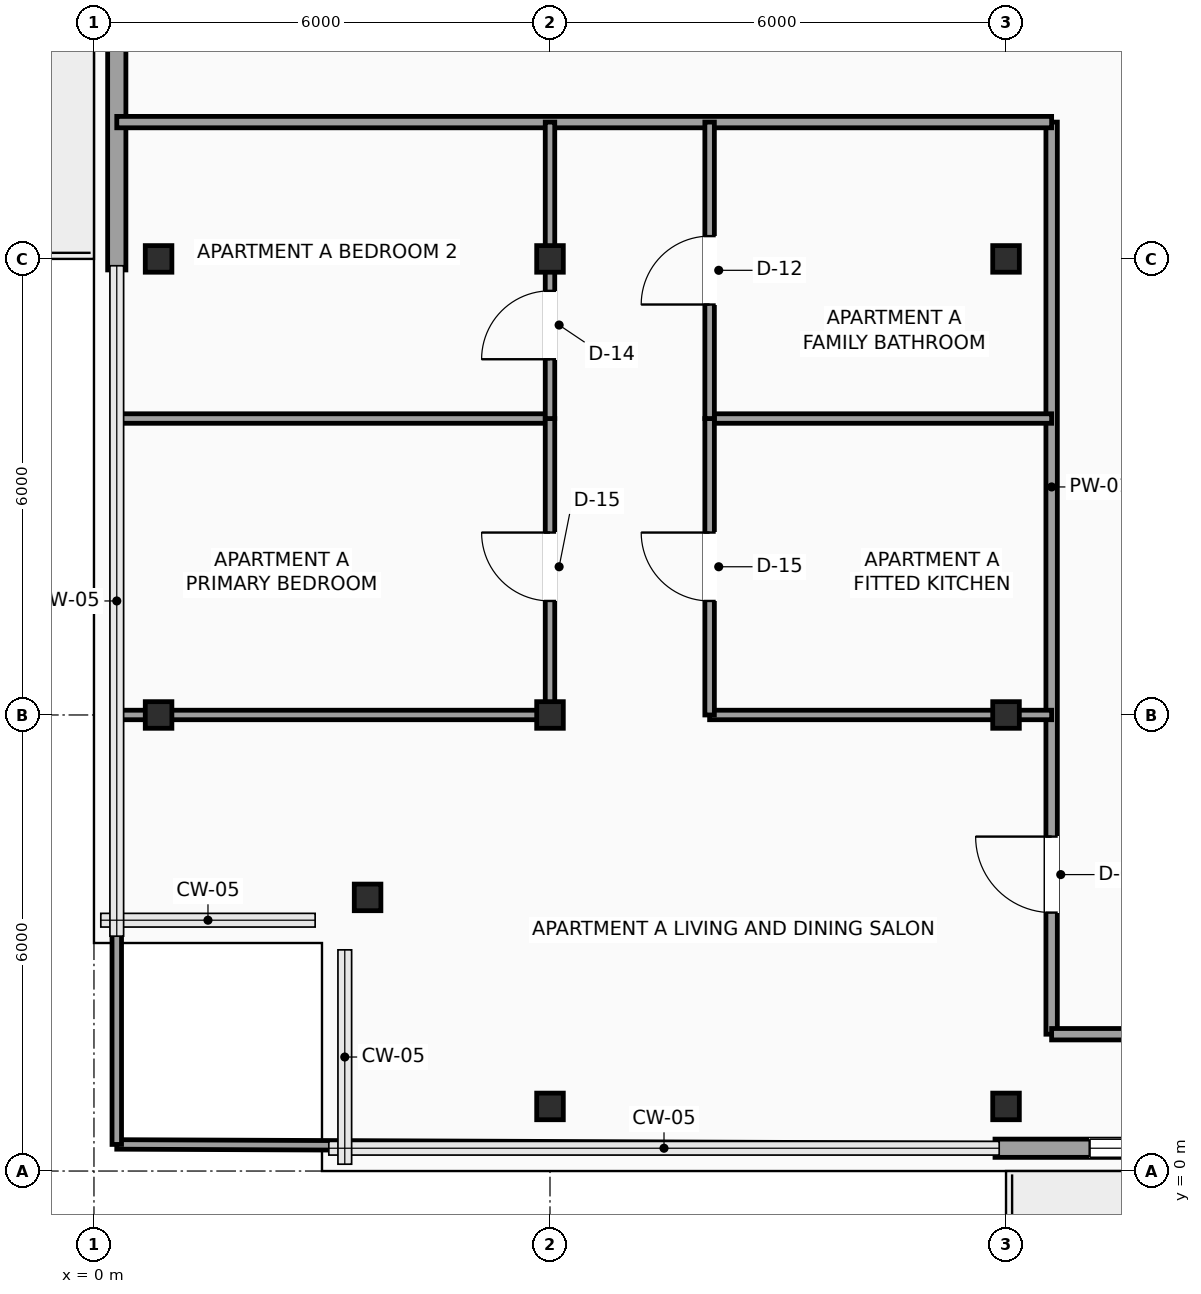
"""IFC4 building model, lengths in metres.
Left out: names, types, materials, properties, quantities, classifications, styles, units other than length and angle.
Written with IfcOpenShell. Run it as: python <this file> out.ifc"""

import sys

from ifc_helpers import new_model, si_unit, direction, frame, frame_2d, origin, origin_2d, place, context, subcontext, project, spatial, rectangle, hollow_rectangle, extrude, element, fill, save


model = new_model("IFC4")
c1 = context("Model", 3, precision=1e-05, world=origin(), true_north=direction((0.0, 1.0)))
c2 = subcontext(c1, "Body", "Model", "MODEL_VIEW")
j1 = project(units=[si_unit("LENGTHUNIT", "METRE"), si_unit("PLANEANGLEUNIT", "RADIAN")], contexts=[c1])
p1 = place(None, origin())
s1 = spatial("IfcSite", under=j1, at=p1, CompositionType="ELEMENT")
p2 = place(p1, origin())
s2 = spatial("IfcBuilding", under=s1, at=p2, CompositionType="ELEMENT")
p3 = place(p2, frame((0.0, 0.0, 267.7)))
s3 = spatial("IfcBuildingStorey", under=s2, at=p3, CompositionType="ELEMENT", Elevation=267.7)
for number, where, z_axis, x_axis in (
    (1, (3.6, 3.6, 0.0), (0.0, 0.0, 1.0), (1.0, 0.0, 0.0)),
    (2, (0.85, 6.0, 0.0), (0.0, 0.0, 1.0), (1.0, 0.0, 0.0)),
    (3, (0.85, 12.0, 0.0), (0.0, 0.0, 1.0), (1.0, 0.0, 0.0)),
    (4, (6.0, 0.85, 0.0), (0.0, 0.0, 1.0), (1.0, 0.0, 0.0)),
    (5, (6.0, 6.0, 0.0), (0.0, 0.0, 1.0), (1.0, 0.0, 0.0)),
    (6, (6.0, 12.0, 0.0), (0.0, 0.0, 1.0), (1.0, 0.0, 0.0)),
    (7, (12.0, 0.85, 0.0), (0.0, 0.0, 1.0), (1.0, 0.0, 0.0)),
    (8, (12.0, 6.0, 0.0), (0.0, 0.0, 1.0), (1.0, 0.0, 0.0)),
    (9, (12.0, 12.0, 0.0), (0.0, 0.0, 1.0), (1.0, 0.0, 0.0)),
):
    element("IfcColumn", number, at=place(p3, frame(where, z_axis=z_axis, x_axis=x_axis)), inside=s3, PredefinedType="COLUMN", context=c2, shape_type="SweptSolid", body=[
        extrude(hollow_rectangle(XDim=0.35, YDim=0.35, WallThickness=0.016, InnerFilletRadius=0.016, OuterFilletRadius=0.032, at=origin_2d()), origin(), (0.0, 0.0, 1.0), 3.5),
    ])
p4 = place(p3, frame((21.145, 0.3, 0.0), z_axis=(0.0, 0.0, 1.0), x_axis=(-1.0, 0.0, 0.0)))
e10 = element("IfcWall", 10, at=p4, inside=s3, PredefinedType="SOLIDWALL", context=c2, shape_type="SweptSolid", body=[
    extrude(rectangle(XDim=9.29, YDim=0.24, at=frame_2d((4.645, 0.0))), origin(), (0.0, 0.0, 1.0), 3.3),
])
p5 = place(p4, frame((3.945, 0.0, 0.0)))
e11 = element("IfcOpeningElement", 11, at=p5, cuts=e10, PredefinedType="OPENING", context=c2, shape_type="SweptSolid", body=[
    extrude(rectangle(XDim=1.05, YDim=2.2, at=frame_2d((0.525, 1.1))), frame((0.0, 0.13, 0.0), z_axis=(0.0, -1.0, 0.0), x_axis=(1.0, 0.0, 0.0)), (0.0, 0.0, 1.0), 0.26),
])
p6 = place(p4, frame((5.345, 0.0, 0.6)))
e12 = element("IfcOpeningElement", 12, at=p6, cuts=e10, PredefinedType="OPENING", context=c2, shape_type="SweptSolid", body=[
    extrude(rectangle(XDim=2.7, YDim=2.3, at=frame_2d((1.35, 1.15))), frame((0.0, 0.13, 0.0), z_axis=(0.0, -1.0, 0.0), x_axis=(1.0, 0.0, 0.0)), (0.0, 0.0, 1.0), 0.26),
])
p7 = place(p4, frame((1.4, 0.0, 0.6)))
e13 = element("IfcOpeningElement", 13, at=p7, cuts=e10, PredefinedType="OPENING", context=c2, shape_type="SweptSolid", body=[
    extrude(rectangle(XDim=0.9, YDim=2.2, at=frame_2d((0.45, 1.1))), frame((0.0, 0.13, 0.0), z_axis=(0.0, -1.0, 0.0), x_axis=(1.0, 0.0, 0.0)), (0.0, 0.0, 1.0), 0.26),
])
p8 = place(p3, frame((0.3, 11.855, 0.0), z_axis=(0.0, 0.0, 1.0), x_axis=(0.0, 1.0, 0.0)))
e14 = element("IfcWall", 14, at=p8, inside=s3, PredefinedType="SOLIDWALL", context=c2, shape_type="SweptSolid", body=[
    extrude(rectangle(XDim=9.29, YDim=0.24, at=frame_2d((4.645, 0.0))), origin(), (0.0, 0.0, 1.0), 3.3),
])
p9 = place(p8, frame((4.7, 0.0, 0.0)))
e15 = element("IfcOpeningElement", 15, at=p9, cuts=e14, PredefinedType="OPENING", context=c2, shape_type="SweptSolid", body=[
    extrude(rectangle(XDim=1.05, YDim=2.2, at=frame_2d((0.525, 1.1))), frame((0.0, 0.13, 0.0), z_axis=(0.0, -1.0, 0.0), x_axis=(1.0, 0.0, 0.0)), (0.0, 0.0, 1.0), 0.26),
])
p10 = place(p8, frame((6.05, 0.0, 0.6)))
e16 = element("IfcOpeningElement", 16, at=p10, cuts=e14, PredefinedType="OPENING", context=c2, shape_type="SweptSolid", body=[
    extrude(rectangle(XDim=2.7, YDim=2.3, at=frame_2d((1.35, 1.15))), frame((0.0, 0.13, 0.0), z_axis=(0.0, -1.0, 0.0), x_axis=(1.0, 0.0, 0.0)), (0.0, 0.0, 1.0), 0.26),
])
p11 = place(p8, frame((2.9, 0.0, 0.6)))
e17 = element("IfcOpeningElement", 17, at=p11, cuts=e14, PredefinedType="OPENING", context=c2, shape_type="SweptSolid", body=[
    extrude(rectangle(XDim=0.9, YDim=2.2, at=frame_2d((0.45, 1.1))), frame((0.0, 0.13, 0.0), z_axis=(0.0, -1.0, 0.0), x_axis=(1.0, 0.0, 0.0)), (0.0, 0.0, 1.0), 0.26),
])
p12 = place(p3, frame((12.6, 1.8, 0.0), z_axis=(0.0, 0.0, 1.0), x_axis=(0.0, 1.0, 0.0)))
e18 = element("IfcWall", 18, at=p12, inside=s3, PredefinedType="PARTITIONING", context=c2, shape_type="SweptSolid", body=[
    extrude(rectangle(XDim=12.0, YDim=0.15, at=frame_2d((6.0, 0.0))), origin(), (0.0, 0.0, 1.0), 3.3),
])
p13 = place(p12, frame((1.6, 0.0, 0.0)))
e19 = element("IfcOpeningElement", 19, at=p13, cuts=e18, PredefinedType="OPENING", context=c2, shape_type="SweptSolid", body=[
    extrude(rectangle(XDim=1.0, YDim=2.2, at=frame_2d((0.5, 1.1))), frame((0.0, 0.085, 0.0), z_axis=(0.0, -1.0, 0.0), x_axis=(1.0, 0.0, 0.0)), (0.0, 0.0, 1.0), 0.17),
])
p14 = place(p3, frame((12.6, 13.8, 0.0), z_axis=(0.0, 0.0, 1.0), x_axis=(-1.0, 0.0, 0.0)))
e20 = element("IfcWall", 20, at=p14, inside=s3, PredefinedType="PARTITIONING", context=c2, shape_type="SweptSolid", body=[
    extrude(rectangle(XDim=12.3, YDim=0.15, at=frame_2d((6.15, 0.0))), origin(), (0.0, 0.0, 1.0), 3.3),
])
p15 = place(p3, frame((14.95, 1.8, 0.0), z_axis=(0.0, 0.0, 1.0), x_axis=(-1.0, 0.0, 0.0)))
e21 = element("IfcWall", 21, at=p15, inside=s3, PredefinedType="PARTITIONING", context=c2, shape_type="SweptSolid", body=[
    extrude(rectangle(XDim=2.35, YDim=0.15, at=frame_2d((1.175, 0.0))), origin(), (0.0, 0.0, 1.0), 3.3),
])
p16 = place(p3, frame((0.3, 0.35, 0.0), z_axis=(0.0, 0.0, 1.0), x_axis=(0.999991685722, -0.004077804208, 0.0)))
e22 = element("IfcWall", 22, at=p16, inside=s3, PredefinedType="PARTITIONING", context=c2, shape_type="SweptSolid", body=[
    extrude(rectangle(XDim=11.555, YDim=0.125, at=frame_2d((5.777, 0.0))), origin(), (0.0, 0.0, 1.0), 3.3),
])
p17 = place(p3, frame((0.3, 0.35, 0.0), z_axis=(0.0, 0.0, 1.0), x_axis=(0.0, 1.0, 0.0)))
e23 = element("IfcWall", 23, at=p17, inside=s3, PredefinedType="PARTITIONING", context=c2, shape_type="SweptSolid", body=[
    extrude(rectangle(XDim=11.505, YDim=0.125, at=frame_2d((5.752, 0.0))), origin(), (0.0, 0.0, 1.0), 3.3),
])
p18 = place(p3, frame((8.1, 6.0, 0.0), z_axis=(0.0, 0.0, 1.0), x_axis=(1.0, 0.0, 0.0)))
e24 = element("IfcWall", 24, at=p18, inside=s3, PredefinedType="PARTITIONING", context=c2, shape_type="SweptSolid", body=[
    extrude(rectangle(XDim=4.5, YDim=0.125, at=frame_2d((2.25, 0.0))), origin(), (0.0, 0.0, 1.0), 2.992),
])
p19 = place(p3, frame((8.1, 9.9, 0.0), z_axis=(0.0, 0.0, 1.0), x_axis=(1.0, 0.0, 0.0)))
e25 = element("IfcWall", 25, at=p19, inside=s3, PredefinedType="PARTITIONING", context=c2, shape_type="SweptSolid", body=[
    extrude(rectangle(XDim=4.5, YDim=0.125, at=frame_2d((2.25, 0.0))), origin(), (0.0, 0.0, 1.0), 3.3),
])
p20 = place(p3, frame((8.1, 6.0, 0.0), z_axis=(0.0, 0.0, 1.0), x_axis=(0.0, 1.0, 0.0)))
e26 = element("IfcWall", 26, at=p20, inside=s3, PredefinedType="PARTITIONING", context=c2, shape_type="SweptSolid", body=[
    extrude(rectangle(XDim=3.9, YDim=0.125, at=frame_2d((1.95, 0.0))), origin(), (0.0, 0.0, 1.0), 3.3),
])
p21 = place(p20, frame((1.5, 0.0, 0.0)))
e27 = element("IfcOpeningElement", 27, at=p21, cuts=e26, PredefinedType="OPENING", context=c2, shape_type="SweptSolid", body=[
    extrude(rectangle(XDim=0.9, YDim=2.1, at=frame_2d((0.45, 1.05))), frame((0.0, 0.073, 0.0), z_axis=(0.0, -1.0, 0.0), x_axis=(1.0, 0.0, 0.0)), (0.0, 0.0, 1.0), 0.145),
])
p22 = place(p3, frame((8.1, 9.9, 0.0), z_axis=(0.0, 0.0, 1.0), x_axis=(0.0, 1.0, 0.0)))
e28 = element("IfcWall", 28, at=p22, inside=s3, PredefinedType="PARTITIONING", context=c2, shape_type="SweptSolid", body=[
    extrude(rectangle(XDim=3.9, YDim=0.125, at=frame_2d((1.95, 0.0))), origin(), (0.0, 0.0, 1.0), 3.3),
])
p23 = place(p22, frame((1.5, 0.0, 0.0)))
e29 = element("IfcOpeningElement", 29, at=p23, cuts=e28, PredefinedType="OPENING", context=c2, shape_type="SweptSolid", body=[
    extrude(rectangle(XDim=0.9, YDim=2.1, at=frame_2d((0.45, 1.05))), frame((0.0, 0.073, 0.0), z_axis=(0.0, -1.0, 0.0), x_axis=(1.0, 0.0, 0.0)), (0.0, 0.0, 1.0), 0.145),
])
p24 = place(p3, frame((0.3, 6.0, 0.0), z_axis=(0.0, 0.0, 1.0), x_axis=(1.0, 0.0, 0.0)))
e30 = element("IfcWall", 30, at=p24, inside=s3, PredefinedType="PARTITIONING", context=c2, shape_type="SweptSolid", body=[
    extrude(rectangle(XDim=5.7, YDim=0.125, at=frame_2d((2.85, 0.0))), origin(), (0.0, 0.0, 1.0), 2.992),
])
p25 = place(p3, frame((0.3, 9.9, 0.0), z_axis=(0.0, 0.0, 1.0), x_axis=(1.0, 0.0, 0.0)))
e31 = element("IfcWall", 31, at=p25, inside=s3, PredefinedType="PARTITIONING", context=c2, shape_type="SweptSolid", body=[
    extrude(rectangle(XDim=5.7, YDim=0.125, at=frame_2d((2.85, 0.0))), origin(), (0.0, 0.0, 1.0), 3.3),
])
p26 = place(p3, frame((6.0, 6.0, 0.0), z_axis=(0.0, 0.0, 1.0), x_axis=(0.0, 1.0, 0.0)))
e32 = element("IfcWall", 32, at=p26, inside=s3, PredefinedType="PARTITIONING", context=c2, shape_type="SweptSolid", body=[
    extrude(rectangle(XDim=3.9, YDim=0.125, at=frame_2d((1.95, 0.0))), origin(), (0.0, 0.0, 1.0), 2.992),
])
p27 = place(p26, frame((1.5, 0.0, 0.0)))
e33 = element("IfcOpeningElement", 33, at=p27, cuts=e32, PredefinedType="OPENING", context=c2, shape_type="SweptSolid", body=[
    extrude(rectangle(XDim=0.9, YDim=2.1, at=frame_2d((0.45, 1.05))), frame((0.0, 0.073, 0.0), z_axis=(0.0, -1.0, 0.0), x_axis=(1.0, 0.0, 0.0)), (0.0, 0.0, 1.0), 0.145),
])
p28 = place(p3, frame((6.0, 9.9, 0.0), z_axis=(0.0, 0.0, 1.0), x_axis=(0.0, 1.0, 0.0)))
e34 = element("IfcWall", 34, at=p28, inside=s3, PredefinedType="PARTITIONING", context=c2, shape_type="SweptSolid", body=[
    extrude(rectangle(XDim=3.9, YDim=0.125, at=frame_2d((1.95, 0.0))), origin(), (0.0, 0.0, 1.0), 2.992),
])
p29 = place(p28, frame((0.78, 0.0, 0.0)))
e35 = element("IfcOpeningElement", 35, at=p29, cuts=e34, PredefinedType="OPENING", context=c2, shape_type="SweptSolid", body=[
    extrude(rectangle(XDim=0.9, YDim=2.1, at=frame_2d((0.45, 1.05))), frame((0.0, 0.073, 0.0), z_axis=(0.0, -1.0, 0.0), x_axis=(1.0, 0.0, 0.0)), (0.0, 0.0, 1.0), 0.145),
])
p30 = place(p6, origin())
e36 = element("IfcWindow", 36, at=p30, inside=s3, PartitioningType="SINGLE_PANEL", PredefinedType="WINDOW", context=c2, shape_type="SweptSolid", body=[
    extrude(rectangle(XDim=2.7, YDim=2.3, at=frame_2d((1.35, 1.15))), frame((0.0, 0.03, 0.0), z_axis=(0.0, -1.0, 0.0), x_axis=(1.0, 0.0, 0.0)), (0.0, 0.0, 1.0), 0.06),
])
fill(e12, e36)
p31 = place(p13, origin())
e37 = element("IfcDoor", 37, at=p31, inside=s3, OperationType="SINGLE_SWING_RIGHT", PredefinedType="DOOR", context=c2, shape_type="SweptSolid", body=[
    extrude(rectangle(XDim=1.0, YDim=2.2, at=frame_2d((0.5, 1.1))), frame((0.0, 0.025, 0.0), z_axis=(0.0, -1.0, 0.0), x_axis=(1.0, 0.0, 0.0)), (0.0, 0.0, 1.0), 0.05),
])
fill(e19, e37)
p32 = place(p21, origin())
e38 = element("IfcDoor", 38, at=p32, inside=s3, OperationType="SINGLE_SWING_RIGHT", PredefinedType="DOOR", context=c2, shape_type="SweptSolid", body=[
    extrude(rectangle(XDim=0.9, YDim=2.1, at=frame_2d((0.45, 1.05))), frame((0.0, 0.025, 0.0), z_axis=(0.0, -1.0, 0.0), x_axis=(1.0, 0.0, 0.0)), (0.0, 0.0, 1.0), 0.05),
])
fill(e27, e38)
p33 = place(p23, origin())
e39 = element("IfcDoor", 39, at=p33, inside=s3, OperationType="SINGLE_SWING_LEFT", PredefinedType="DOOR", context=c2, shape_type="SweptSolid", body=[
    extrude(rectangle(XDim=0.9, YDim=2.1, at=frame_2d((0.45, 1.05))), frame((0.0, 0.025, 0.0), z_axis=(0.0, -1.0, 0.0), x_axis=(1.0, 0.0, 0.0)), (0.0, 0.0, 1.0), 0.05),
])
fill(e29, e39)
p34 = place(p27, origin())
e40 = element("IfcDoor", 40, at=p34, inside=s3, OperationType="SINGLE_SWING_RIGHT", PredefinedType="DOOR", context=c2, shape_type="SweptSolid", body=[
    extrude(rectangle(XDim=0.9, YDim=2.1, at=frame_2d((0.45, 1.05))), frame((0.0, 0.025, 0.0), z_axis=(0.0, -1.0, 0.0), x_axis=(1.0, 0.0, 0.0)), (0.0, 0.0, 1.0), 0.05),
])
fill(e33, e40)
p35 = place(p29, origin())
e41 = element("IfcDoor", 41, at=p35, inside=s3, OperationType="SINGLE_SWING_LEFT", PredefinedType="DOOR", context=c2, shape_type="SweptSolid", body=[
    extrude(rectangle(XDim=0.9, YDim=2.1, at=frame_2d((0.45, 1.05))), frame((0.0, 0.025, 0.0), z_axis=(0.0, -1.0, 0.0), x_axis=(1.0, 0.0, 0.0)), (0.0, 0.0, 1.0), 0.05),
])
fill(e35, e41)
save(model, sys.argv[1])
